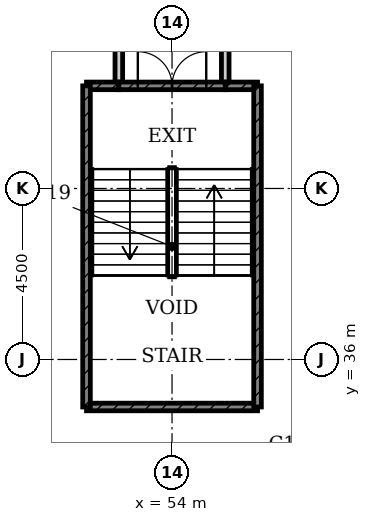
"""IFC4 building model, lengths in metres.
Left out: names, types, materials, properties, quantities, classifications, styles, units other than length and angle.
Written with IfcOpenShell. Run it as: python <this file> out.ifc"""

import sys

from ifc_helpers import new_model, si_unit, direction, frame, frame_2d, origin, place, context, subcontext, project, spatial, rectangle, extrude, element, fill, save


model = new_model("IFC4")
c1 = context("Model", 3, precision=1e-05, world=origin(), true_north=direction((0.0, 1.0)))
c2 = subcontext(c1, "Body", "Model", "MODEL_VIEW")
j1 = project(units=[si_unit("LENGTHUNIT", "METRE"), si_unit("PLANEANGLEUNIT", "RADIAN")], contexts=[c1])
p1 = place(None, origin())
s1 = spatial("IfcSite", under=j1, at=p1, CompositionType="ELEMENT")
p2 = place(p1, origin())
s2 = spatial("IfcBuilding", under=s1, at=p2, CompositionType="ELEMENT")
p3 = place(p2, origin())
s3 = spatial("IfcBuildingStorey", under=s2, at=p3, CompositionType="ELEMENT", Elevation=0.0)
p4 = place(p3, frame((52.6, 43.2, 0.0), z_axis=(0.0, 0.0, 1.0), x_axis=(0.0, 1.0, 0.0)))
e1 = element("IfcWall", 1, at=p4, inside=s3, PredefinedType="PARTITIONING", context=c2, shape_type="SweptSolid", body=[
    extrude(rectangle(XDim=11.09, YDim=0.2, at=frame_2d((5.545, 0.0))), origin(), (0.0, 0.0, 1.0), 6.25),
])
p5 = place(p3, frame((55.4, 43.2, 0.0), z_axis=(0.0, 0.0, 1.0), x_axis=(0.0, 1.0, 0.0)))
e2 = element("IfcWall", 2, at=p5, inside=s3, PredefinedType="PARTITIONING", context=c2, shape_type="SweptSolid", body=[
    extrude(rectangle(XDim=1.8, YDim=0.2, at=frame_2d((0.9, 0.0))), origin(), (0.0, 0.0, 1.0), 6.25),
])
p6 = place(p3, frame((51.75, 34.75, 0.0), z_axis=(0.0, 0.0, 1.0), x_axis=(1.0, 0.0, 0.0)))
e3 = element("IfcWall", 3, at=p6, inside=s3, PredefinedType="SHEAR", context=c2, shape_type="SweptSolid", body=[
    extrude(rectangle(XDim=4.5, YDim=0.2, at=frame_2d((2.25, 0.0))), origin(), (0.0, 0.0, 1.0), 6.25),
])
for number, where, z_axis, x_axis in (
    (4, (51.75, 43.2, 0.0), (0.0, 0.0, 1.0), (1.0, 0.0, 0.0)),
    (5, (55.4, 43.2, 0.0), (0.0, 0.0, 1.0), (1.0, 0.0, 0.0)),
):
    element("IfcWall", number, at=place(p3, frame(where, z_axis=z_axis, x_axis=x_axis)), inside=s3, PredefinedType="SHEAR", context=c2, shape_type="SweptSolid", body=[
        extrude(rectangle(XDim=0.85, YDim=0.2, at=frame_2d((0.425, 0.0))), origin(), (0.0, 0.0, 1.0), 6.25),
    ])
p7 = place(p3, frame((52.6, 43.2, 0.0), z_axis=(0.0, 0.0, 1.0), x_axis=(1.0, 0.0, 0.0)))
e6 = element("IfcWall", 6, at=p7, inside=s3, PredefinedType="SHEAR", context=c2, shape_type="SweptSolid", body=[
    extrude(rectangle(XDim=2.8, YDim=0.2, at=frame_2d((1.4, 0.0))), origin(), (0.0, 0.0, 1.0), 6.25),
])
p8 = place(p7, frame((0.5, 0.0, 0.0)))
e7 = element("IfcOpeningElement", 7, at=p8, cuts=e6, PredefinedType="OPENING", context=c2, shape_type="SweptSolid", body=[
    extrude(rectangle(XDim=1.8, YDim=2.1, at=frame_2d((0.9, 1.05))), frame((0.0, 0.11, 0.0), z_axis=(0.0, -1.0, 0.0), x_axis=(1.0, 0.0, 0.0)), (0.0, 0.0, 1.0), 0.22),
])
for number, where, z_axis, x_axis in (
    (8, (51.75, 34.75, 0.0), (0.0, 0.0, 1.0), (0.0, 1.0, 0.0)),
    (9, (56.25, 34.75, 0.0), (0.0, 0.0, 1.0), (0.0, 1.0, 0.0)),
):
    element("IfcWall", number, at=place(p3, frame(where, z_axis=z_axis, x_axis=x_axis)), inside=s3, PredefinedType="SHEAR", context=c2, shape_type="SweptSolid", body=[
        extrude(rectangle(XDim=8.45, YDim=0.2, at=frame_2d((4.225, 0.0))), origin(), (0.0, 0.0, 1.0), 6.25),
    ])
p9 = place(p8, origin())
e10 = element("IfcDoor", 10, at=p9, inside=s3, OperationType="DOUBLE_DOOR_SINGLE_SWING", PredefinedType="DOOR", context=c2, shape_type="SweptSolid", body=[
    extrude(rectangle(XDim=1.8, YDim=2.1, at=frame_2d((0.9, 1.05))), frame((0.0, 0.025, 0.0), z_axis=(0.0, -1.0, 0.0), x_axis=(1.0, 0.0, 0.0)), (0.0, 0.0, 1.0), 0.05),
])
fill(e7, e10)
save(model, sys.argv[1])
